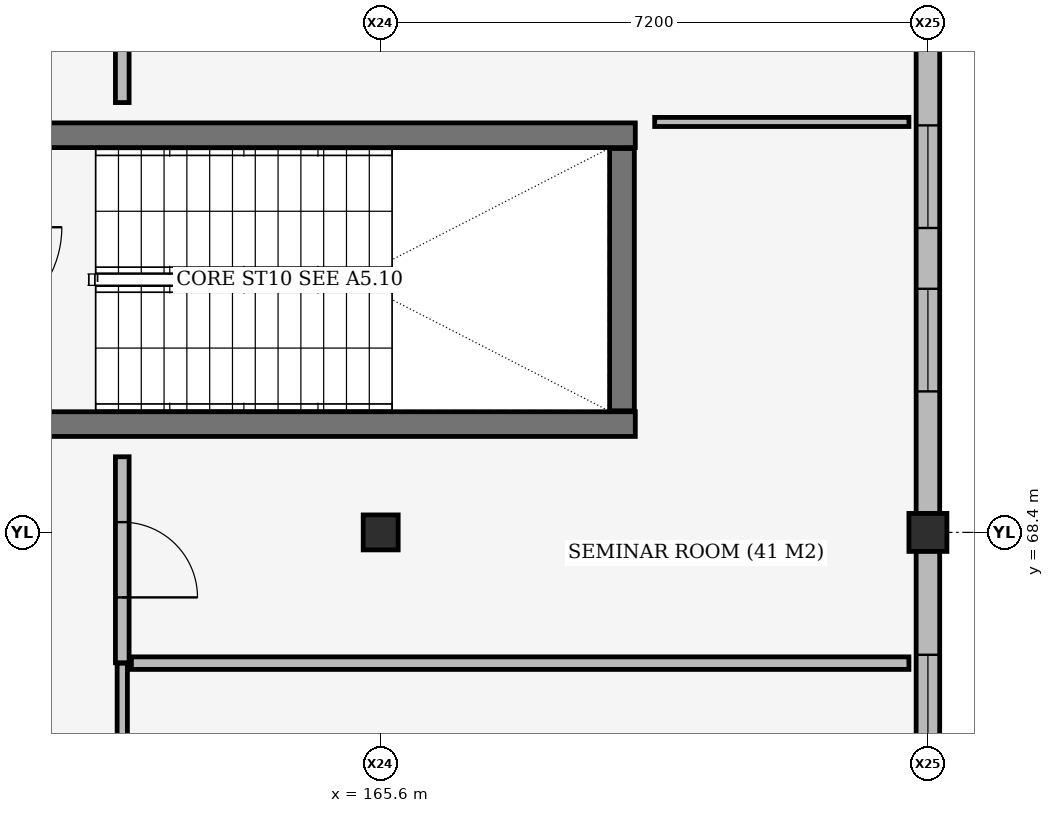
"""IFC4 building model, lengths in metres.
Left out: names, types, materials, properties, quantities, classifications, styles, units other than length and angle.
Written with IfcOpenShell. Run it as: python <this file> out.ifc"""

import sys

from ifc_helpers import new_model, si_unit, direction, frame, frame_2d, origin, origin_2d, place, context, subcontext, project, spatial, rectangle, extrude, element, fill, save


model = new_model("IFC4")
c1 = context("Model", 3, precision=1e-05, world=origin(), true_north=direction((0.0, 1.0)))
c2 = subcontext(c1, "Body", "Model", "MODEL_VIEW")
j1 = project(units=[si_unit("LENGTHUNIT", "METRE"), si_unit("PLANEANGLEUNIT", "RADIAN")], contexts=[c1])
p1 = place(None, origin())
s1 = spatial("IfcSite", under=j1, at=p1, CompositionType="ELEMENT")
p2 = place(p1, origin())
s2 = spatial("IfcBuilding", under=s1, at=p2, CompositionType="ELEMENT")
p3 = place(p2, frame((0.0, 0.0, 13.8)))
s3 = spatial("IfcBuildingStorey", under=s2, at=p3, CompositionType="ELEMENT", Elevation=13.8)
p4 = place(p3, frame((165.6, 68.4, 0.0), z_axis=(0.0, 0.0, 1.0), x_axis=(1.0, 0.0, 0.0)))
e1 = element("IfcColumn", 1, at=p4, inside=s3, PredefinedType="COLUMN", context=c2, shape_type="SweptSolid", body=[
    extrude(rectangle(XDim=0.46, YDim=0.46, at=origin_2d()), origin(), (0.0, 0.0, 1.0), 3.935),
])
p5 = place(p3, frame((172.8, 68.4, 0.0), z_axis=(0.0, 0.0, 1.0), x_axis=(1.0, 0.0, 0.0)))
e2 = element("IfcColumn", 2, at=p5, inside=s3, PredefinedType="COLUMN", context=c2, shape_type="SweptSolid", body=[
    extrude(rectangle(XDim=0.5, YDim=0.5, at=origin_2d()), origin(), (0.0, 0.0, 1.0), 3.935),
])
for number, where, z_axis, x_axis in (
    (3, (159.85, 69.825, 0.0), (0.0, 0.0, 1.0), (1.0, 0.0, 0.0)),
    (4, (168.95, 73.625, 0.0), (0.0, 0.0, 1.0), (-1.0, 0.0, 0.0)),
):
    element("IfcWall", number, at=place(p3, frame(where, z_axis=z_axis, x_axis=x_axis)), inside=s3, PredefinedType="SHEAR", context=c2, shape_type="SweptSolid", body=[
        extrude(rectangle(XDim=9.1, YDim=0.325, at=frame_2d((4.55, 0.0))), origin(), (0.0, 0.0, 1.0), 3.935),
    ])
p6 = place(p3, frame((168.775, 70.0, 0.0), z_axis=(0.0, 0.0, 1.0), x_axis=(0.0, 1.0, 0.0)))
e5 = element("IfcWall", 5, at=p6, inside=s3, PredefinedType="SHEAR", context=c2, shape_type="SweptSolid", body=[
    extrude(rectangle(XDim=3.45, YDim=0.325, at=frame_2d((1.725, 0.0))), origin(), (0.0, 0.0, 1.0), 3.935),
])
p7 = place(p3, frame((172.8, 68.158, 0.0), z_axis=(0.0, 0.0, 1.0), x_axis=(0.0, -1.0, 0.0)))
e6 = element("IfcWall", 6, at=p7, inside=s3, PredefinedType="STANDARD", context=c2, shape_type="SweptSolid", body=[
    extrude(rectangle(XDim=6.736, YDim=0.31, at=frame_2d((3.368, 0.0))), origin(), (0.0, 0.0, 1.0), 3.935),
])
p8 = place(p7, frame((1.368, 0.0, 0.8)))
e7 = element("IfcOpeningElement", 7, at=p8, cuts=e6, PredefinedType="OPENING", context=c2, shape_type="SweptSolid", body=[
    extrude(rectangle(XDim=1.6, YDim=2.6, at=frame_2d((0.8, 1.3))), frame((0.0, 0.165, 0.0), z_axis=(0.0, -1.0, 0.0), x_axis=(1.0, 0.0, 0.0)), (0.0, 0.0, 1.0), 0.33),
])
p9 = place(p7, frame((3.768, 0.0, 0.8)))
e8 = element("IfcOpeningElement", 8, at=p9, cuts=e6, PredefinedType="OPENING", context=c2, shape_type="SweptSolid", body=[
    extrude(rectangle(XDim=1.6, YDim=2.6, at=frame_2d((0.8, 1.3))), frame((0.0, 0.165, 0.0), z_axis=(0.0, -1.0, 0.0), x_axis=(1.0, 0.0, 0.0)), (0.0, 0.0, 1.0), 0.33),
])
p10 = place(p3, frame((172.8, 75.368, 0.0), z_axis=(0.0, 0.0, 1.0), x_axis=(0.0, -1.0, 0.0)))
e9 = element("IfcWall", 9, at=p10, inside=s3, PredefinedType="STANDARD", context=c2, shape_type="SweptSolid", body=[
    extrude(rectangle(XDim=6.726, YDim=0.31, at=frame_2d((3.363, 0.0))), origin(), (0.0, 0.0, 1.0), 3.295),
])
p11 = place(p10, frame((1.613, 0.0, 0.95)))
e10 = element("IfcOpeningElement", 10, at=p11, cuts=e9, PredefinedType="OPENING", context=c2, shape_type="SweptSolid", body=[
    extrude(rectangle(XDim=1.35, YDim=2.0, at=frame_2d((0.675, 1.0))), frame((0.0, 0.165, 0.0), z_axis=(0.0, -1.0, 0.0), x_axis=(1.0, 0.0, 0.0)), (0.0, 0.0, 1.0), 0.33),
])
p12 = place(p10, frame((3.763, 0.0, 0.95)))
e11 = element("IfcOpeningElement", 11, at=p12, cuts=e9, PredefinedType="OPENING", context=c2, shape_type="SweptSolid", body=[
    extrude(rectangle(XDim=1.35, YDim=2.0, at=frame_2d((0.675, 1.0))), frame((0.0, 0.165, 0.0), z_axis=(0.0, -1.0, 0.0), x_axis=(1.0, 0.0, 0.0)), (0.0, 0.0, 1.0), 0.33),
])
p13 = place(p3, frame((162.2, 56.005, 0.0), z_axis=(0.0, 0.0, 1.0), x_axis=(0.0, 1.0, 0.0)))
e12 = element("IfcWall", 12, at=p13, inside=s3, PredefinedType="PARTITIONING", context=c2, shape_type="SweptSolid", body=[
    extrude(rectangle(XDim=10.675, YDim=0.135, at=frame_2d((5.337, 0.0))), origin(), (0.0, 0.0, 1.0), 3.935),
])
p14 = place(p13, frame((4.762, 0.0, 0.0)))
e13 = element("IfcOpeningElement", 13, at=p14, cuts=e12, PredefinedType="OPENING", context=c2, shape_type="SweptSolid", body=[
    extrude(rectangle(XDim=1.15, YDim=2.2, at=frame_2d((0.575, 1.1))), frame((0.0, 0.077, 0.0), z_axis=(0.0, -1.0, 0.0), x_axis=(1.0, 0.0, 0.0)), (0.0, 0.0, 1.0), 0.155),
])
p15 = place(p3, frame((162.32, 66.68, 0.0), z_axis=(0.0, 0.0, 1.0), x_axis=(1.0, 0.0, 0.0)))
e14 = element("IfcWall", 14, at=p15, inside=s3, PredefinedType="PARTITIONING", context=c2, shape_type="SweptSolid", body=[
    extrude(rectangle(XDim=10.23, YDim=0.165, at=frame_2d((5.115, 0.0))), origin(), (0.0, 0.0, 1.0), 3.935),
])
p16 = place(p3, frame((162.2, 66.685, 0.0), z_axis=(0.0, 0.0, 1.0), x_axis=(0.0, 1.0, 0.0)))
e15 = element("IfcWall", 15, at=p16, inside=s3, PredefinedType="PARTITIONING", context=c2, shape_type="SweptSolid", body=[
    extrude(rectangle(XDim=2.71, YDim=0.18, at=frame_2d((1.355, 0.0))), origin(), (0.0, 0.0, 1.0), 3.195),
])
p17 = place(p16, frame((0.86, 0.0, 0.0)))
e16 = element("IfcOpeningElement", 16, at=p17, cuts=e15, PredefinedType="OPENING", context=c2, shape_type="SweptSolid", body=[
    extrude(rectangle(XDim=0.99, YDim=2.18, at=frame_2d((0.495, 1.09))), frame((0.0, 0.1, 0.0), z_axis=(0.0, -1.0, 0.0), x_axis=(1.0, 0.0, 0.0)), (0.0, 0.0, 1.0), 0.2),
])
p18 = place(p3, frame((169.205, 73.8, 0.0), z_axis=(0.0, 0.0, 1.0), x_axis=(1.0, 0.0, 0.0)))
e17 = element("IfcWall", 17, at=p18, inside=s3, PredefinedType="PARTITIONING", context=c2, shape_type="SweptSolid", body=[
    extrude(rectangle(XDim=3.345, YDim=0.12, at=frame_2d((1.672, 0.0))), origin(), (0.0, 0.0, 1.0), 3.575),
])
p19 = place(p3, frame((162.2, 74.055, 0.0), z_axis=(0.0, 0.0, 1.0), x_axis=(0.0, 1.0, 0.0)))
e18 = element("IfcWall", 18, at=p19, inside=s3, PredefinedType="PARTITIONING", context=c2, shape_type="SweptSolid", body=[
    extrude(rectangle(XDim=8.645, YDim=0.18, at=frame_2d((4.323, 0.0))), origin(), (0.0, 0.0, 1.0), 3.255),
])
p20 = place(p19, frame((3.833, 0.0, 0.0)))
e19 = element("IfcOpeningElement", 19, at=p20, cuts=e18, PredefinedType="OPENING", context=c2, shape_type="SweptSolid", body=[
    extrude(rectangle(XDim=0.98, YDim=2.18, at=frame_2d((0.49, 1.09))), frame((0.0, 0.1, 0.0), z_axis=(0.0, -1.0, 0.0), x_axis=(1.0, 0.0, 0.0)), (0.0, 0.0, 1.0), 0.2),
])
p21 = place(p8, origin())
e20 = element("IfcWindow", 20, at=p21, inside=s3, PartitioningType="DOUBLE_PANEL_VERTICAL", PredefinedType="WINDOW", context=c2, shape_type="SweptSolid", body=[
    extrude(rectangle(XDim=1.6, YDim=2.6, at=frame_2d((0.8, 1.3))), frame((0.0, 0.03, 0.0), z_axis=(0.0, -1.0, 0.0), x_axis=(1.0, 0.0, 0.0)), (0.0, 0.0, 1.0), 0.06),
])
fill(e7, e20)
p22 = place(p11, origin())
e21 = element("IfcWindow", 21, at=p22, inside=s3, PartitioningType="DOUBLE_PANEL_VERTICAL", PredefinedType="WINDOW", context=c2, shape_type="SweptSolid", body=[
    extrude(rectangle(XDim=1.35, YDim=2.0, at=frame_2d((0.675, 1.0))), frame((0.0, 0.03, 0.0), z_axis=(0.0, -1.0, 0.0), x_axis=(1.0, 0.0, 0.0)), (0.0, 0.0, 1.0), 0.06),
])
fill(e10, e21)
p23 = place(p12, origin())
e22 = element("IfcWindow", 22, at=p23, inside=s3, PartitioningType="DOUBLE_PANEL_VERTICAL", PredefinedType="WINDOW", context=c2, shape_type="SweptSolid", body=[
    extrude(rectangle(XDim=1.35, YDim=2.0, at=frame_2d((0.675, 1.0))), frame((0.0, 0.03, 0.0), z_axis=(0.0, -1.0, 0.0), x_axis=(1.0, 0.0, 0.0)), (0.0, 0.0, 1.0), 0.06),
])
fill(e11, e22)
p24 = place(p17, origin())
e23 = element("IfcDoor", 23, at=p24, inside=s3, OperationType="SINGLE_SWING_RIGHT", PredefinedType="DOOR", context=c2, shape_type="SweptSolid", body=[
    extrude(rectangle(XDim=0.99, YDim=2.18, at=frame_2d((0.495, 1.09))), frame((0.0, 0.025, 0.0), z_axis=(0.0, -1.0, 0.0), x_axis=(1.0, 0.0, 0.0)), (0.0, 0.0, 1.0), 0.05),
])
fill(e16, e23)
save(model, sys.argv[1])
